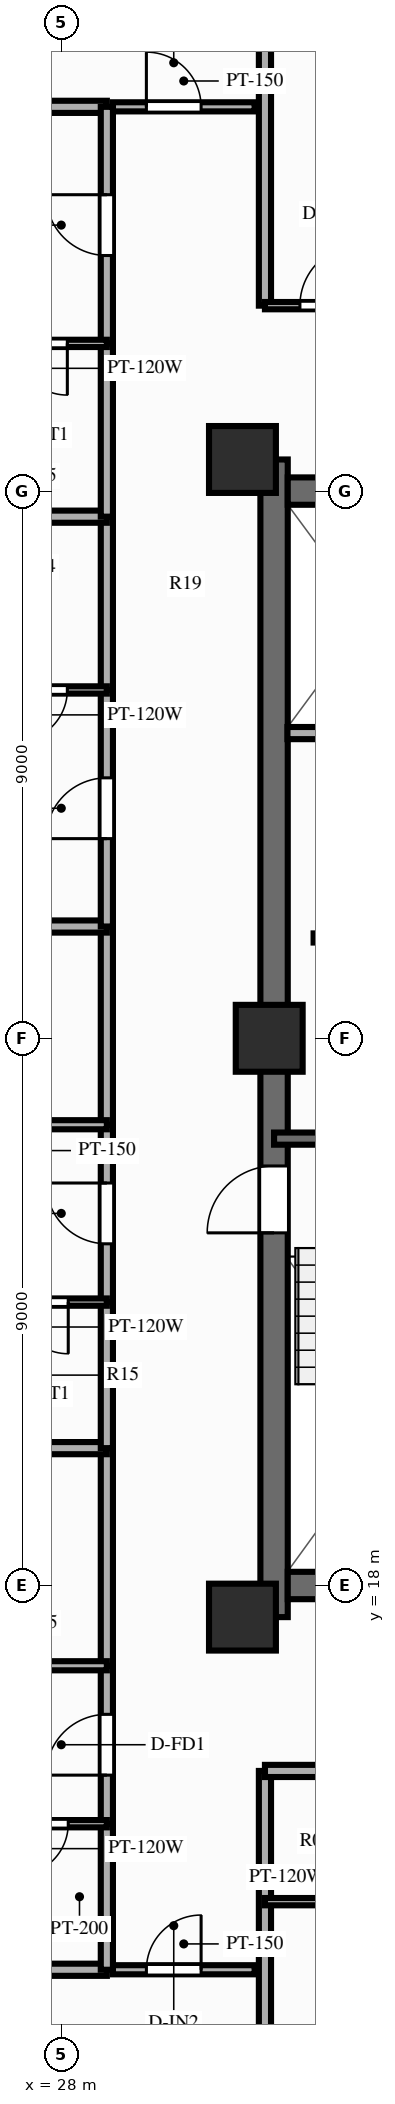
"""IFC4 building model, lengths in metres.
Left out: names, types, materials, properties, quantities, classifications, styles, units other than length and angle.
Written with IfcOpenShell. Run it as: python <this file> out.ifc"""

import sys

from ifc_helpers import new_model, si_unit, direction, frame, frame_2d, origin, origin_2d, place, context, subcontext, project, spatial, rectangle, extrude, source, transform, mapped, element, fill, save


model = new_model("IFC4")
c1 = context("Model", 3, precision=1e-05, world=origin(), true_north=direction((0.0, 1.0)))
c2 = subcontext(c1, "Body", "Model", "MODEL_VIEW")
j1 = project(units=[si_unit("LENGTHUNIT", "METRE"), si_unit("PLANEANGLEUNIT", "RADIAN")], contexts=[c1])
p1 = place(None, origin())
s1 = spatial("IfcSite", under=j1, at=p1, CompositionType="ELEMENT")
p2 = place(p1, origin())
s2 = spatial("IfcBuilding", under=s1, at=p2, CompositionType="ELEMENT")
p3 = place(p2, frame((0.0, 0.0, 196.6)))
s3 = spatial("IfcBuildingStorey", under=s2, at=p3, CompositionType="ELEMENT", Elevation=196.6)
p4 = place(p3, frame((31.5, 17.48, 0.0), z_axis=(0.0, 0.0, 1.0), x_axis=(0.0, 1.0, 0.0)))
e1 = element("IfcWall", 1, at=p4, inside=s3, PredefinedType="SHEAR", context=c2, shape_type="SweptSolid", body=[
    extrude(rectangle(XDim=19.04, YDim=0.45, at=frame_2d((9.52, 0.0))), origin(), (0.0, 0.0, 1.0), 3.0),
])
p5 = place(p4, frame((6.32, 0.0, 0.0)))
e2 = element("IfcOpeningElement", 2, at=p5, cuts=e1, PredefinedType="OPENING", context=c2, shape_type="SweptSolid", body=[
    extrude(rectangle(XDim=1.1, YDim=2.15, at=frame_2d((0.55, 1.075))), frame((0.0, 0.237, 0.0), z_axis=(0.0, -1.0, 0.0), x_axis=(1.0, 0.0, 0.0)), (0.0, 0.0, 1.0), 0.474),
])
p6 = place(p3, frame((31.725, 18.0, 0.0), z_axis=(0.0, 0.0, 1.0), x_axis=(1.0, 0.0, 0.0)))
e3 = element("IfcWall", 3, at=p6, inside=s3, PredefinedType="SHEAR", context=c2, shape_type="SweptSolid", body=[
    extrude(rectangle(XDim=12.55, YDim=0.45, at=frame_2d((6.275, 0.0))), origin(), (0.0, 0.0, 1.0), 3.0),
])
p7 = place(p3, frame((31.725, 36.0, 0.0), z_axis=(0.0, 0.0, 1.0), x_axis=(1.0, 0.0, 0.0)))
e4 = element("IfcWall", 4, at=p7, inside=s3, PredefinedType="SHEAR", context=c2, shape_type="SweptSolid", body=[
    extrude(rectangle(XDim=12.55, YDim=0.45, at=frame_2d((6.275, 0.0))), origin(), (0.0, 0.0, 1.0), 3.0),
])
p8 = place(p7, frame((5.225, 0.0, 0.0), z_axis=(0.0, 0.0, 1.0), x_axis=(-1.0, 0.0, 0.0)))
e5 = element("IfcOpeningElement", 5, at=p8, cuts=e4, PredefinedType="OPENING", context=c2, shape_type="SweptSolid", body=[
    extrude(rectangle(XDim=1.4, YDim=2.15, at=frame_2d((0.7, 1.075))), frame((0.0, 0.237, 0.0), z_axis=(0.0, -1.0, 0.0), x_axis=(1.0, 0.0, 0.0)), (0.0, 0.0, 1.0), 0.474),
])
m1 = source(origin(), c2, "Body", "SweptSolid", [
    extrude(rectangle(XDim=1.1, YDim=1.1, at=origin_2d()), origin(), (0.0, 0.0, 1.0), 3.0),
])
for number, where, z_axis, x_axis in (
    (6, (30.98, 17.48, 0.0), (0.0, 0.0, 1.0), (1.0, 0.0, 0.0)),
    (7, (30.98, 36.52, 0.0), (0.0, 0.0, 1.0), (1.0, 0.0, 0.0)),
    (8, (31.42, 27.0, 0.0), (0.0, 0.0, 1.0), (1.0, 0.0, 0.0)),
):
    element("IfcColumn", number, at=place(p3, frame(where, z_axis=z_axis, x_axis=x_axis)), inside=s3, PredefinedType="COLUMN", context=c2, shape_type="MappedRepresentation", body=[
        mapped(m1, transform((0.0, 0.0, 0.0), scale=1.0)),
    ])
p9 = place(p3, frame((32.15, 28.65, 0.0), z_axis=(0.0, 0.0, 1.0), x_axis=(1.0, 0.0, 0.0)))
e9 = element("IfcWall", 9, at=p9, inside=s3, PredefinedType="PARTITIONING", context=c2, shape_type="SweptSolid", body=[
    extrude(rectangle(XDim=2.27, YDim=0.15, at=frame_2d((1.135, 0.0))), origin(), (0.0, 0.0, 1.0), 2.14),
])
p10 = place(p3, frame((31.5, 25.35, 0.0), z_axis=(0.0, 0.0, 1.0), x_axis=(1.0, 0.0, 0.0)))
e10 = element("IfcWall", 10, at=p10, inside=s3, PredefinedType="SOLIDWALL", context=c2, shape_type="SweptSolid", body=[
    extrude(rectangle(XDim=3.93, YDim=0.2, at=frame_2d((1.965, 0.0))), origin(), (0.0, 0.0, 1.0), 2.79),
])
p11 = place(p3, frame((31.72, 32.02, 0.0), z_axis=(0.0, 0.0, 1.0), x_axis=(1.0, 0.0, 0.0)))
e11 = element("IfcWall", 11, at=p11, inside=s3, PredefinedType="PARTITIONING", context=c2, shape_type="SweptSolid", body=[
    extrude(rectangle(XDim=2.8, YDim=0.2, at=frame_2d((1.4, 0.0))), origin(), (0.0, 0.0, 1.0), 2.79),
])
p12 = place(p3, frame((28.85, 11.68, 0.0), z_axis=(0.0, 0.0, 1.0), x_axis=(1.0, 0.0, 0.0)))
e12 = element("IfcWall", 12, at=p12, inside=s3, PredefinedType="PARTITIONING", context=c2, shape_type="SweptSolid", body=[
    extrude(rectangle(XDim=2.33, YDim=0.15, at=frame_2d((1.165, 0.0))), origin(), (0.0, 0.0, 1.0), 2.79),
])
p13 = place(p12, frame((0.55, 0.0, 0.0)))
e13 = element("IfcOpeningElement", 13, at=p13, cuts=e12, PredefinedType="OPENING", context=c2, shape_type="SweptSolid", body=[
    extrude(rectangle(XDim=0.9, YDim=2.1, at=frame_2d((0.45, 1.05))), frame((0.0, 0.087, 0.0), z_axis=(0.0, -1.0, 0.0), x_axis=(1.0, 0.0, 0.0)), (0.0, 0.0, 1.0), 0.174),
])
p14 = place(p3, frame((28.85, 42.32, 0.0), z_axis=(0.0, 0.0, 1.0), x_axis=(1.0, 0.0, 0.0)))
e14 = element("IfcWall", 14, at=p14, inside=s3, PredefinedType="PARTITIONING", context=c2, shape_type="SweptSolid", body=[
    extrude(rectangle(XDim=2.33, YDim=0.15, at=frame_2d((1.165, 0.0))), origin(), (0.0, 0.0, 1.0), 2.79),
])
p15 = place(p14, frame((0.55, 0.0, 0.0)))
e15 = element("IfcOpeningElement", 15, at=p15, cuts=e14, PredefinedType="OPENING", context=c2, shape_type="SweptSolid", body=[
    extrude(rectangle(XDim=0.9, YDim=2.1, at=frame_2d((0.45, 1.05))), frame((0.0, 0.087, 0.0), z_axis=(0.0, -1.0, 0.0), x_axis=(1.0, 0.0, 0.0)), (0.0, 0.0, 1.0), 0.174),
])
p16 = place(p3, frame((31.35, 14.95, 0.0), z_axis=(0.0, 0.0, 1.0), x_axis=(0.0, -1.0, 0.0)))
e16 = element("IfcWall", 16, at=p16, inside=s3, PredefinedType="PARTITIONING", context=c2, shape_type="SweptSolid", body=[
    extrude(rectangle(XDim=8.8, YDim=0.2, at=frame_2d((4.4, 0.0))), origin(), (0.0, 0.0, 1.0), 2.39),
])
p17 = place(p3, frame((31.35, 14.95, 0.0), z_axis=(0.0, 0.0, 1.0), x_axis=(1.0, 0.0, 0.0)))
e17 = element("IfcWall", 17, at=p17, inside=s3, PredefinedType="PARTITIONING", context=c2, shape_type="SweptSolid", body=[
    extrude(rectangle(XDim=2.85, YDim=0.2, at=frame_2d((1.425, 0.0))), origin(), (0.0, 0.0, 1.0), 2.79),
])
p18 = place(p3, frame((31.35, 12.8, 0.0), z_axis=(0.0, 0.0, 1.0), x_axis=(1.0, 0.0, 0.0)))
e18 = element("IfcWall", 18, at=p18, inside=s3, PredefinedType="PARTITIONING", context=c2, shape_type="SweptSolid", body=[
    extrude(rectangle(XDim=2.85, YDim=0.12, at=frame_2d((1.425, 0.0))), origin(), (0.0, 0.0, 1.0), 2.79),
])
p19 = place(p3, frame((31.35, 39.05, 0.0), z_axis=(0.0, 0.0, 1.0), x_axis=(0.0, 1.0, 0.0)))
e19 = element("IfcWall", 19, at=p19, inside=s3, PredefinedType="PARTITIONING", context=c2, shape_type="SweptSolid", body=[
    extrude(rectangle(XDim=8.8, YDim=0.2, at=frame_2d((4.4, 0.0))), origin(), (0.0, 0.0, 1.0), 2.39),
])
p20 = place(p3, frame((31.35, 39.05, 0.0), z_axis=(0.0, 0.0, 1.0), x_axis=(1.0, 0.0, 0.0)))
e20 = element("IfcWall", 20, at=p20, inside=s3, PredefinedType="PARTITIONING", context=c2, shape_type="SweptSolid", body=[
    extrude(rectangle(XDim=2.15, YDim=0.12, at=frame_2d((1.075, 0.0))), origin(), (0.0, 0.0, 1.0), 2.79),
])
p21 = place(p20, frame((0.575, 0.0, 0.0)))
e21 = element("IfcOpeningElement", 21, at=p21, cuts=e20, PredefinedType="OPENING", context=c2, shape_type="SweptSolid", body=[
    extrude(rectangle(XDim=1.0, YDim=2.1, at=frame_2d((0.5, 1.05))), frame((0.0, 0.072, 0.0), z_axis=(0.0, -1.0, 0.0), x_axis=(1.0, 0.0, 0.0)), (0.0, 0.0, 1.0), 0.144),
])
for number, where, z_axis, x_axis in (
    (22, (28.75, 11.68, 0.0), (0.0, 0.0, 1.0), (-1.0, 0.0, 0.0)),
    (23, (28.75, 42.32, 0.0), (0.0, 0.0, 1.0), (-1.0, 0.0, 0.0)),
):
    element("IfcWall", number, at=place(p3, frame(where, z_axis=z_axis, x_axis=x_axis)), inside=s3, PredefinedType="PARTITIONING", context=c2, shape_type="SweptSolid", body=[
        extrude(rectangle(XDim=9.1, YDim=0.2, at=frame_2d((4.55, 0.0))), origin(), (0.0, 0.0, 1.0), 2.79),
    ])
p22 = place(p3, frame((28.75, 11.68, 0.0), z_axis=(0.0, 0.0, 1.0), x_axis=(0.0, 1.0, 0.0)))
e24 = element("IfcWall", 24, at=p22, inside=s3, PredefinedType="PARTITIONING", context=c2, shape_type="SweptSolid", body=[
    extrude(rectangle(XDim=2.402, YDim=0.2, at=frame_2d((1.201, 0.0))), origin(), (0.0, 0.0, 1.0), 2.79),
])
p23 = place(p3, frame((28.75, 14.082, 0.0), z_axis=(0.0, 0.0, 1.0), x_axis=(0.0, 1.0, 0.0)))
e25 = element("IfcWall", 25, at=p23, inside=s3, PredefinedType="PARTITIONING", context=c2, shape_type="SweptSolid", body=[
    extrude(rectangle(XDim=2.598, YDim=0.2, at=frame_2d((1.299, 0.0))), origin(), (0.0, 0.0, 1.0), 2.79),
])
p24 = place(p23, frame((0.799, 0.0, 0.0)))
e26 = element("IfcOpeningElement", 26, at=p24, cuts=e25, PredefinedType="OPENING", context=c2, shape_type="SweptSolid", body=[
    extrude(rectangle(XDim=1.0, YDim=2.15, at=frame_2d((0.5, 1.075))), frame((0.0, 0.112, 0.0), z_axis=(0.0, -1.0, 0.0), x_axis=(1.0, 0.0, 0.0)), (0.0, 0.0, 1.0), 0.224),
])
p25 = place(p3, frame((28.75, 16.68, 0.0), z_axis=(0.0, 0.0, 1.0), x_axis=(0.0, 1.0, 0.0)))
e27 = element("IfcWall", 27, at=p25, inside=s3, PredefinedType="PARTITIONING", context=c2, shape_type="SweptSolid", body=[
    extrude(rectangle(XDim=3.579, YDim=0.2, at=frame_2d((1.79, 0.0))), origin(), (0.0, 0.0, 1.0), 2.79),
])
p26 = place(p3, frame((28.75, 14.082, 0.0), z_axis=(0.0, 0.0, 1.0), x_axis=(-1.0, 0.0, 0.0)))
e28 = element("IfcWall", 28, at=p26, inside=s3, PredefinedType="PARTITIONING", context=c2, shape_type="SweptSolid", body=[
    extrude(rectangle(XDim=2.12, YDim=0.12, at=frame_2d((1.06, 0.0))), origin(), (0.0, 0.0, 1.0), 2.79),
])
p27 = place(p26, frame((0.635, 0.0, 0.0)))
e29 = element("IfcOpeningElement", 29, at=p27, cuts=e28, PredefinedType="OPENING", context=c2, shape_type="SweptSolid", body=[
    extrude(rectangle(XDim=0.85, YDim=2.05, at=frame_2d((0.425, 1.025))), frame((0.0, 0.072, 0.0), z_axis=(0.0, -1.0, 0.0), x_axis=(1.0, 0.0, 0.0)), (0.0, 0.0, 1.0), 0.144),
])
p28 = place(p3, frame((28.75, 16.68, 0.0), z_axis=(0.0, 0.0, 1.0), x_axis=(-1.0, 0.0, 0.0)))
e30 = element("IfcWall", 30, at=p28, inside=s3, PredefinedType="PARTITIONING", context=c2, shape_type="SweptSolid", body=[
    extrude(rectangle(XDim=3.08, YDim=0.15, at=frame_2d((1.54, 0.0))), origin(), (0.0, 0.0, 1.0), 2.79),
])
p29 = place(p28, frame((1.09, 0.0, 0.0)))
e31 = element("IfcOpeningElement", 31, at=p29, cuts=e30, PredefinedType="OPENING", context=c2, shape_type="SweptSolid", body=[
    extrude(rectangle(XDim=0.9, YDim=2.1, at=frame_2d((0.45, 1.05))), frame((0.0, 0.087, 0.0), z_axis=(0.0, -1.0, 0.0), x_axis=(1.0, 0.0, 0.0)), (0.0, 0.0, 1.0), 0.174),
])
p30 = place(p3, frame((28.75, 20.259, 0.0), z_axis=(0.0, 0.0, 1.0), x_axis=(-1.0, 0.0, 0.0)))
e32 = element("IfcWall", 32, at=p30, inside=s3, PredefinedType="PARTITIONING", context=c2, shape_type="SweptSolid", body=[
    extrude(rectangle(XDim=9.1, YDim=0.2, at=frame_2d((4.55, 0.0))), origin(), (0.0, 0.0, 1.0), 2.79),
])
p31 = place(p3, frame((28.75, 20.259, 0.0), z_axis=(0.0, 0.0, 1.0), x_axis=(0.0, 1.0, 0.0)))
e33 = element("IfcWall", 33, at=p31, inside=s3, PredefinedType="PARTITIONING", context=c2, shape_type="SweptSolid", body=[
    extrude(rectangle(XDim=2.402, YDim=0.2, at=frame_2d((1.201, 0.0))), origin(), (0.0, 0.0, 1.0), 2.79),
])
p32 = place(p3, frame((28.75, 22.661, 0.0), z_axis=(0.0, 0.0, 1.0), x_axis=(0.0, 1.0, 0.0)))
e34 = element("IfcWall", 34, at=p32, inside=s3, PredefinedType="PARTITIONING", context=c2, shape_type="SweptSolid", body=[
    extrude(rectangle(XDim=2.917, YDim=0.2, at=frame_2d((1.458, 0.0))), origin(), (0.0, 0.0, 1.0), 2.79),
])
p33 = place(p32, frame((0.958, 0.0, 0.0)))
e35 = element("IfcOpeningElement", 35, at=p33, cuts=e34, PredefinedType="OPENING", context=c2, shape_type="SweptSolid", body=[
    extrude(rectangle(XDim=1.0, YDim=2.15, at=frame_2d((0.5, 1.075))), frame((0.0, 0.112, 0.0), z_axis=(0.0, -1.0, 0.0), x_axis=(1.0, 0.0, 0.0)), (0.0, 0.0, 1.0), 0.224),
])
p34 = place(p3, frame((28.75, 25.578, 0.0), z_axis=(0.0, 0.0, 1.0), x_axis=(0.0, 1.0, 0.0)))
e36 = element("IfcWall", 36, at=p34, inside=s3, PredefinedType="PARTITIONING", context=c2, shape_type="SweptSolid", body=[
    extrude(rectangle(XDim=3.26, YDim=0.2, at=frame_2d((1.63, 0.0))), origin(), (0.0, 0.0, 1.0), 2.79),
])
p35 = place(p3, frame((28.75, 22.661, 0.0), z_axis=(0.0, 0.0, 1.0), x_axis=(-1.0, 0.0, 0.0)))
e37 = element("IfcWall", 37, at=p35, inside=s3, PredefinedType="PARTITIONING", context=c2, shape_type="SweptSolid", body=[
    extrude(rectangle(XDim=2.12, YDim=0.12, at=frame_2d((1.06, 0.0))), origin(), (0.0, 0.0, 1.0), 2.79),
])
p36 = place(p35, frame((0.635, 0.0, 0.0)))
e38 = element("IfcOpeningElement", 38, at=p36, cuts=e37, PredefinedType="OPENING", context=c2, shape_type="SweptSolid", body=[
    extrude(rectangle(XDim=0.85, YDim=2.05, at=frame_2d((0.425, 1.025))), frame((0.0, 0.072, 0.0), z_axis=(0.0, -1.0, 0.0), x_axis=(1.0, 0.0, 0.0)), (0.0, 0.0, 1.0), 0.144),
])
p37 = place(p3, frame((28.75, 25.578, 0.0), z_axis=(0.0, 0.0, 1.0), x_axis=(-1.0, 0.0, 0.0)))
e39 = element("IfcWall", 39, at=p37, inside=s3, PredefinedType="PARTITIONING", context=c2, shape_type="SweptSolid", body=[
    extrude(rectangle(XDim=3.08, YDim=0.15, at=frame_2d((1.54, 0.0))), origin(), (0.0, 0.0, 1.0), 2.79),
])
p38 = place(p37, frame((1.09, 0.0, 0.0)))
e40 = element("IfcOpeningElement", 40, at=p38, cuts=e39, PredefinedType="OPENING", context=c2, shape_type="SweptSolid", body=[
    extrude(rectangle(XDim=0.9, YDim=2.1, at=frame_2d((0.45, 1.05))), frame((0.0, 0.087, 0.0), z_axis=(0.0, -1.0, 0.0), x_axis=(1.0, 0.0, 0.0)), (0.0, 0.0, 1.0), 0.174),
])
p39 = place(p3, frame((28.75, 28.838, 0.0), z_axis=(0.0, 0.0, 1.0), x_axis=(-1.0, 0.0, 0.0)))
e41 = element("IfcWall", 41, at=p39, inside=s3, PredefinedType="PARTITIONING", context=c2, shape_type="SweptSolid", body=[
    extrude(rectangle(XDim=9.1, YDim=0.2, at=frame_2d((4.55, 0.0))), origin(), (0.0, 0.0, 1.0), 2.79),
])
p40 = place(p3, frame((28.75, 28.838, 0.0), z_axis=(0.0, 0.0, 1.0), x_axis=(0.0, 1.0, 0.0)))
e42 = element("IfcWall", 42, at=p40, inside=s3, PredefinedType="PARTITIONING", context=c2, shape_type="SweptSolid", body=[
    extrude(rectangle(XDim=3.891, YDim=0.2, at=frame_2d((1.945, 0.0))), origin(), (0.0, 0.0, 1.0), 2.79),
])
p41 = place(p40, frame((1.445, 0.0, 0.0)))
e43 = element("IfcOpeningElement", 43, at=p41, cuts=e42, PredefinedType="OPENING", context=c2, shape_type="SweptSolid", body=[
    extrude(rectangle(XDim=1.0, YDim=2.15, at=frame_2d((0.5, 1.075))), frame((0.0, 0.112, 0.0), z_axis=(0.0, -1.0, 0.0), x_axis=(1.0, 0.0, 0.0)), (0.0, 0.0, 1.0), 0.224),
])
p42 = place(p3, frame((28.75, 32.729, 0.0), z_axis=(0.0, 0.0, 1.0), x_axis=(0.0, 1.0, 0.0)))
e44 = element("IfcWall", 44, at=p42, inside=s3, PredefinedType="PARTITIONING", context=c2, shape_type="SweptSolid", body=[
    extrude(rectangle(XDim=2.85, YDim=0.2, at=frame_2d((1.425, 0.0))), origin(), (0.0, 0.0, 1.0), 2.79),
])
p43 = place(p3, frame((28.75, 32.729, 0.0), z_axis=(0.0, 0.0, 1.0), x_axis=(-1.0, 0.0, 0.0)))
e45 = element("IfcWall", 45, at=p43, inside=s3, PredefinedType="PARTITIONING", context=c2, shape_type="SweptSolid", body=[
    extrude(rectangle(XDim=2.15, YDim=0.12, at=frame_2d((1.075, 0.0))), origin(), (0.0, 0.0, 1.0), 2.79),
])
p44 = place(p43, frame((0.65, 0.0, 0.0)))
e46 = element("IfcOpeningElement", 46, at=p44, cuts=e45, PredefinedType="OPENING", context=c2, shape_type="SweptSolid", body=[
    extrude(rectangle(XDim=0.85, YDim=2.05, at=frame_2d((0.425, 1.025))), frame((0.0, 0.072, 0.0), z_axis=(0.0, -1.0, 0.0), x_axis=(1.0, 0.0, 0.0)), (0.0, 0.0, 1.0), 0.144),
])
p45 = place(p3, frame((28.75, 35.579, 0.0), z_axis=(0.0, 0.0, 1.0), x_axis=(-1.0, 0.0, 0.0)))
e47 = element("IfcWall", 47, at=p45, inside=s3, PredefinedType="PARTITIONING", context=c2, shape_type="SweptSolid", body=[
    extrude(rectangle(XDim=9.1, YDim=0.2, at=frame_2d((4.55, 0.0))), origin(), (0.0, 0.0, 1.0), 2.79),
])
p46 = place(p3, frame((28.75, 35.579, 0.0), z_axis=(0.0, 0.0, 1.0), x_axis=(0.0, 1.0, 0.0)))
e48 = element("IfcWall", 48, at=p46, inside=s3, PredefinedType="PARTITIONING", context=c2, shape_type="SweptSolid", body=[
    extrude(rectangle(XDim=2.85, YDim=0.2, at=frame_2d((1.425, 0.0))), origin(), (0.0, 0.0, 1.0), 2.79),
])
p47 = place(p3, frame((28.75, 38.429, 0.0), z_axis=(0.0, 0.0, 1.0), x_axis=(0.0, 1.0, 0.0)))
e49 = element("IfcWall", 49, at=p47, inside=s3, PredefinedType="PARTITIONING", context=c2, shape_type="SweptSolid", body=[
    extrude(rectangle(XDim=3.891, YDim=0.2, at=frame_2d((1.945, 0.0))), origin(), (0.0, 0.0, 1.0), 2.79),
])
p48 = place(p47, frame((1.445, 0.0, 0.0)))
e50 = element("IfcOpeningElement", 50, at=p48, cuts=e49, PredefinedType="OPENING", context=c2, shape_type="SweptSolid", body=[
    extrude(rectangle(XDim=1.0, YDim=2.15, at=frame_2d((0.5, 1.075))), frame((0.0, 0.112, 0.0), z_axis=(0.0, -1.0, 0.0), x_axis=(1.0, 0.0, 0.0)), (0.0, 0.0, 1.0), 0.224),
])
p49 = place(p3, frame((28.75, 38.429, 0.0), z_axis=(0.0, 0.0, 1.0), x_axis=(-1.0, 0.0, 0.0)))
e51 = element("IfcWall", 51, at=p49, inside=s3, PredefinedType="PARTITIONING", context=c2, shape_type="SweptSolid", body=[
    extrude(rectangle(XDim=2.15, YDim=0.12, at=frame_2d((1.075, 0.0))), origin(), (0.0, 0.0, 1.0), 2.79),
])
p50 = place(p49, frame((0.65, 0.0, 0.0)))
e52 = element("IfcOpeningElement", 52, at=p50, cuts=e51, PredefinedType="OPENING", context=c2, shape_type="SweptSolid", body=[
    extrude(rectangle(XDim=0.85, YDim=2.05, at=frame_2d((0.425, 1.025))), frame((0.0, 0.072, 0.0), z_axis=(0.0, -1.0, 0.0), x_axis=(1.0, 0.0, 0.0)), (0.0, 0.0, 1.0), 0.144),
])
m2 = source(origin(), c2, "Body", "SweptSolid", [
    extrude(rectangle(XDim=1.1, YDim=2.15, at=frame_2d((0.55, 1.075))), frame((0.0, 0.025, 0.0), z_axis=(0.0, -1.0, 0.0), x_axis=(1.0, 0.0, 0.0)), (0.0, 0.0, 1.0), 0.05),
])
p51 = place(p5, origin())
e53 = element("IfcDoor", 53, at=p51, inside=s3, OperationType="SINGLE_SWING_LEFT", PredefinedType="DOOR", context=c2, shape_type="MappedRepresentation", body=[
    mapped(m2, transform((0.0, 0.0, 0.0), scale=1.0)),
])
fill(e2, e53)
m3 = source(origin(), c2, "Body", "SweptSolid", [
    extrude(rectangle(XDim=0.9, YDim=2.1, at=frame_2d((0.45, 1.05))), frame((0.0, 0.025, 0.0), z_axis=(0.0, -1.0, 0.0), x_axis=(1.0, 0.0, 0.0)), (0.0, 0.0, 1.0), 0.05),
])
p52 = place(p13, origin())
e54 = element("IfcDoor", 54, at=p52, inside=s3, OperationType="SINGLE_SWING_RIGHT", PredefinedType="DOOR", context=c2, shape_type="MappedRepresentation", body=[
    mapped(m3, transform((0.0, 0.0, 0.0), scale=1.0)),
])
fill(e13, e54)
p53 = place(p15, origin())
e55 = element("IfcDoor", 55, at=p53, inside=s3, OperationType="SINGLE_SWING_LEFT", PredefinedType="DOOR", context=c2, shape_type="MappedRepresentation", body=[
    mapped(m3, transform((0.0, 0.0, 0.0), scale=1.0)),
])
fill(e15, e55)
m4 = source(origin(), c2, "Body", "SweptSolid", [
    extrude(rectangle(XDim=1.0, YDim=2.1, at=frame_2d((0.5, 1.05))), frame((0.0, 0.025, 0.0), z_axis=(0.0, -1.0, 0.0), x_axis=(1.0, 0.0, 0.0)), (0.0, 0.0, 1.0), 0.05),
])
p54 = place(p21, origin())
e56 = element("IfcDoor", 56, at=p54, inside=s3, OperationType="SINGLE_SWING_RIGHT", PredefinedType="DOOR", context=c2, shape_type="MappedRepresentation", body=[
    mapped(m4, transform((0.0, 0.0, 0.0), scale=1.0)),
])
fill(e21, e56)
m5 = source(origin(), c2, "Body", "SweptSolid", [
    extrude(rectangle(XDim=1.0, YDim=2.15, at=frame_2d((0.5, 1.075))), frame((0.0, 0.025, 0.0), z_axis=(0.0, -1.0, 0.0), x_axis=(1.0, 0.0, 0.0)), (0.0, 0.0, 1.0), 0.05),
])
p55 = place(p24, origin())
e57 = element("IfcDoor", 57, at=p55, inside=s3, OperationType="SINGLE_SWING_LEFT", PredefinedType="DOOR", context=c2, shape_type="MappedRepresentation", body=[
    mapped(m5, transform((0.0, 0.0, 0.0), scale=1.0)),
])
fill(e26, e57)
m6 = source(origin(), c2, "Body", "SweptSolid", [
    extrude(rectangle(XDim=0.85, YDim=2.05, at=frame_2d((0.425, 1.025))), frame((0.0, 0.025, 0.0), z_axis=(0.0, -1.0, 0.0), x_axis=(1.0, 0.0, 0.0)), (0.0, 0.0, 1.0), 0.05),
])
p56 = place(p27, origin())
e58 = element("IfcDoor", 58, at=p56, inside=s3, OperationType="SINGLE_SWING_RIGHT", PredefinedType="DOOR", context=c2, shape_type="MappedRepresentation", body=[
    mapped(m6, transform((0.0, 0.0, 0.0), scale=1.0)),
])
fill(e29, e58)
p57 = place(p33, origin())
e59 = element("IfcDoor", 59, at=p57, inside=s3, OperationType="SINGLE_SWING_RIGHT", PredefinedType="DOOR", context=c2, shape_type="MappedRepresentation", body=[
    mapped(m5, transform((0.0, 0.0, 0.0), scale=1.0)),
])
fill(e35, e59)
p58 = place(p36, origin())
e60 = element("IfcDoor", 60, at=p58, inside=s3, OperationType="SINGLE_SWING_LEFT", PredefinedType="DOOR", context=c2, shape_type="MappedRepresentation", body=[
    mapped(m6, transform((0.0, 0.0, 0.0), scale=1.0)),
])
fill(e38, e60)
p59 = place(p41, origin())
e61 = element("IfcDoor", 61, at=p59, inside=s3, OperationType="SINGLE_SWING_LEFT", PredefinedType="DOOR", context=c2, shape_type="MappedRepresentation", body=[
    mapped(m5, transform((0.0, 0.0, 0.0), scale=1.0)),
])
fill(e43, e61)
p60 = place(p44, origin())
e62 = element("IfcDoor", 62, at=p60, inside=s3, OperationType="SINGLE_SWING_RIGHT", PredefinedType="DOOR", context=c2, shape_type="MappedRepresentation", body=[
    mapped(m6, transform((0.0, 0.0, 0.0), scale=1.0)),
])
fill(e46, e62)
p61 = place(p48, origin())
e63 = element("IfcDoor", 63, at=p61, inside=s3, OperationType="SINGLE_SWING_RIGHT", PredefinedType="DOOR", context=c2, shape_type="MappedRepresentation", body=[
    mapped(m5, transform((0.0, 0.0, 0.0), scale=1.0)),
])
fill(e50, e63)
p62 = place(p50, origin())
e64 = element("IfcDoor", 64, at=p62, inside=s3, OperationType="SINGLE_SWING_LEFT", PredefinedType="DOOR", context=c2, shape_type="MappedRepresentation", body=[
    mapped(m6, transform((0.0, 0.0, 0.0), scale=1.0)),
])
fill(e52, e64)
save(model, sys.argv[1])
